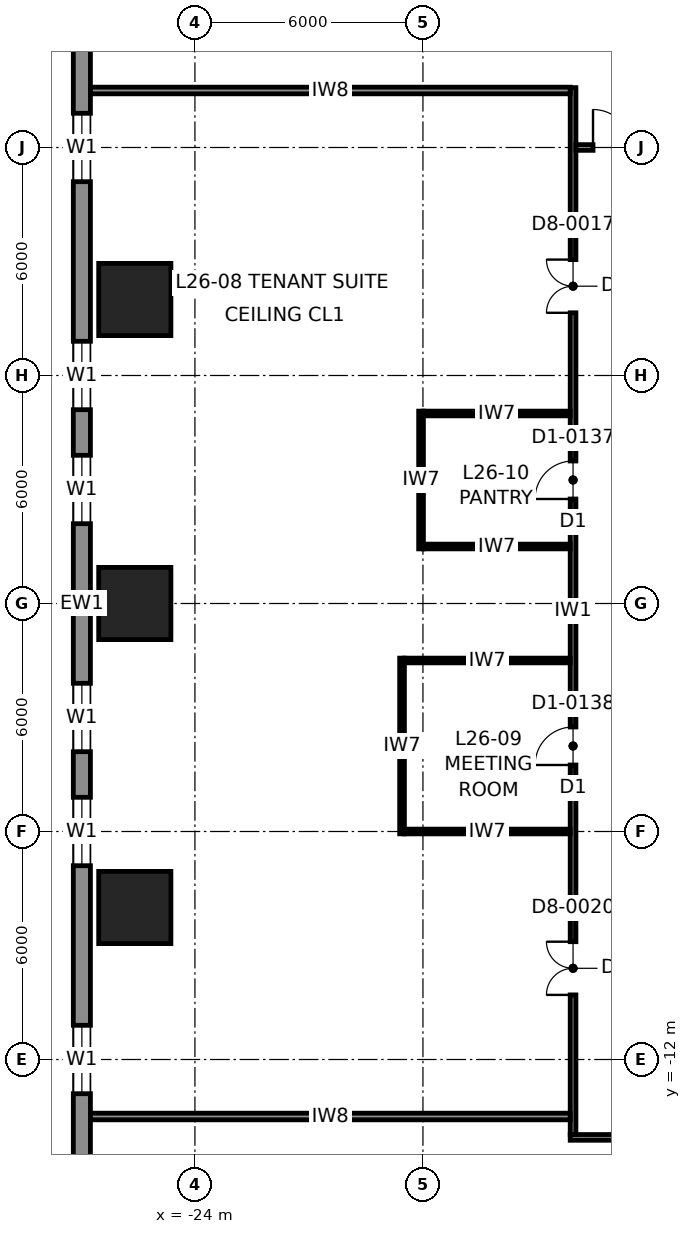
"""IFC4 building model, lengths in metres.
Left out: names, types, materials, properties, quantities, classifications, styles, units other than length and angle.
Written with IfcOpenShell. Run it as: python <this file> out.ifc"""

import sys

from ifc_helpers import new_model, si_unit, direction, frame, frame_2d, origin, origin_2d, place, context, subcontext, project, spatial, rectangle, extrude, element, fill, save


model = new_model("IFC4")
c1 = context("Model", 3, precision=1e-05, world=origin(), true_north=direction((0.0, 1.0)))
c2 = subcontext(c1, "Body", "Model", "MODEL_VIEW")
j1 = project(units=[si_unit("LENGTHUNIT", "METRE"), si_unit("PLANEANGLEUNIT", "RADIAN")], contexts=[c1])
p1 = place(None, origin())
s1 = spatial("IfcSite", under=j1, at=p1, CompositionType="ELEMENT")
p2 = place(p1, origin())
s2 = spatial("IfcBuilding", under=s1, at=p2, CompositionType="ELEMENT")
p3 = place(p2, frame((0.0, 0.0, 131.8)))
s3 = spatial("IfcBuildingStorey", under=s2, at=p3, CompositionType="ELEMENT", Elevation=131.8)
for number, where, z_axis, x_axis in (
    (1, (-25.582, 0.0, 0.0), (0.04, 0.0, 0.999), (0.0, 1.0, 0.0)),
    (2, (-25.582, 8.0, 0.0), (0.04, 0.0, 0.999), (0.0, 1.0, 0.0)),
    (3, (-25.582, -8.0, 0.0), (0.04, 0.0, 0.999), (0.0, 1.0, 0.0)),
):
    element("IfcColumn", number, at=place(p3, frame(where, z_axis=z_axis, x_axis=x_axis)), inside=s3, PredefinedType="COLUMN", context=c2, shape_type="SweptSolid", body=[
        extrude(rectangle(XDim=1.9, YDim=1.9, at=origin_2d()), origin(), (0.0, 0.0, 1.0), 4.003),
    ])
p4 = place(p3, frame((-26.975, 22.7, 0.0), z_axis=(0.0, 0.0, 1.0), x_axis=(0.0, -1.0, 0.0)))
e4 = element("IfcWall", 4, at=p4, inside=s3, PredefinedType="SOLIDWALL", context=c2, shape_type="SweptSolid", body=[
    extrude(rectangle(XDim=45.4, YDim=0.45, at=frame_2d((22.7, 0.0))), origin(), (0.0, 0.0, 1.0), 3.83),
])
p5 = place(p4, frame((3.8, 0.0, 0.7)))
e5 = element("IfcOpeningElement", 5, at=p5, cuts=e4, PredefinedType="OPENING", context=c2, shape_type="SweptSolid", body=[
    extrude(rectangle(XDim=1.8, YDim=2.6, at=frame_2d((0.9, 1.3))), frame((0.0, 0.235, 0.0), z_axis=(0.0, -1.0, 0.0), x_axis=(1.0, 0.0, 0.0)), (0.0, 0.0, 1.0), 0.47),
])
p6 = place(p4, frame((9.8, 0.0, 0.7)))
e6 = element("IfcOpeningElement", 6, at=p6, cuts=e4, PredefinedType="OPENING", context=c2, shape_type="SweptSolid", body=[
    extrude(rectangle(XDim=1.8, YDim=2.6, at=frame_2d((0.9, 1.3))), frame((0.0, 0.235, 0.0), z_axis=(0.0, -1.0, 0.0), x_axis=(1.0, 0.0, 0.0)), (0.0, 0.0, 1.0), 0.47),
])
p7 = place(p4, frame((15.8, 0.0, 0.7)))
e7 = element("IfcOpeningElement", 7, at=p7, cuts=e4, PredefinedType="OPENING", context=c2, shape_type="SweptSolid", body=[
    extrude(rectangle(XDim=1.8, YDim=2.6, at=frame_2d((0.9, 1.3))), frame((0.0, 0.235, 0.0), z_axis=(0.0, -1.0, 0.0), x_axis=(1.0, 0.0, 0.0)), (0.0, 0.0, 1.0), 0.47),
])
p8 = place(p4, frame((18.8, 0.0, 0.7)))
e8 = element("IfcOpeningElement", 8, at=p8, cuts=e4, PredefinedType="OPENING", context=c2, shape_type="SweptSolid", body=[
    extrude(rectangle(XDim=1.8, YDim=2.6, at=frame_2d((0.9, 1.3))), frame((0.0, 0.235, 0.0), z_axis=(0.0, -1.0, 0.0), x_axis=(1.0, 0.0, 0.0)), (0.0, 0.0, 1.0), 0.47),
])
p9 = place(p4, frame((24.8, 0.0, 0.7)))
e9 = element("IfcOpeningElement", 9, at=p9, cuts=e4, PredefinedType="OPENING", context=c2, shape_type="SweptSolid", body=[
    extrude(rectangle(XDim=1.8, YDim=2.6, at=frame_2d((0.9, 1.3))), frame((0.0, 0.235, 0.0), z_axis=(0.0, -1.0, 0.0), x_axis=(1.0, 0.0, 0.0)), (0.0, 0.0, 1.0), 0.47),
])
p10 = place(p4, frame((27.8, 0.0, 0.7)))
e10 = element("IfcOpeningElement", 10, at=p10, cuts=e4, PredefinedType="OPENING", context=c2, shape_type="SweptSolid", body=[
    extrude(rectangle(XDim=1.8, YDim=2.6, at=frame_2d((0.9, 1.3))), frame((0.0, 0.235, 0.0), z_axis=(0.0, -1.0, 0.0), x_axis=(1.0, 0.0, 0.0)), (0.0, 0.0, 1.0), 0.47),
])
p11 = place(p4, frame((33.8, 0.0, 0.7)))
e11 = element("IfcOpeningElement", 11, at=p11, cuts=e4, PredefinedType="OPENING", context=c2, shape_type="SweptSolid", body=[
    extrude(rectangle(XDim=1.8, YDim=2.6, at=frame_2d((0.9, 1.3))), frame((0.0, 0.235, 0.0), z_axis=(0.0, -1.0, 0.0), x_axis=(1.0, 0.0, 0.0)), (0.0, 0.0, 1.0), 0.47),
])
p12 = place(p4, frame((39.8, 0.0, 0.7)))
e12 = element("IfcOpeningElement", 12, at=p12, cuts=e4, PredefinedType="OPENING", context=c2, shape_type="SweptSolid", body=[
    extrude(rectangle(XDim=1.8, YDim=2.6, at=frame_2d((0.9, 1.3))), frame((0.0, 0.235, 0.0), z_axis=(0.0, -1.0, 0.0), x_axis=(1.0, 0.0, 0.0)), (0.0, 0.0, 1.0), 0.47),
])
p13 = place(p3, frame((14.125, -14.05, 0.0), z_axis=(0.0, 0.0, 1.0), x_axis=(-1.0, 0.0, 0.0)))
e13 = element("IfcWall", 13, at=p13, inside=s3, PredefinedType="PARTITIONING", context=c2, shape_type="SweptSolid", body=[
    extrude(rectangle(XDim=28.25, YDim=0.15, at=frame_2d((14.125, 0.0))), origin(), (0.0, 0.0, 1.0), 3.83),
])
p14 = place(p13, frame((24.325, 0.0, 0.0)))
e14 = element("IfcOpeningElement", 14, at=p14, cuts=e13, PredefinedType="OPENING", context=c2, shape_type="SweptSolid", body=[
    extrude(rectangle(XDim=1.4, YDim=2.3, at=frame_2d((0.7, 1.15))), frame((0.0, 0.085, 0.0), z_axis=(0.0, -1.0, 0.0), x_axis=(1.0, 0.0, 0.0)), (0.0, 0.0, 1.0), 0.17),
])
p15 = place(p13, frame((13.425, 0.0, 0.0)))
e15 = element("IfcOpeningElement", 15, at=p15, cuts=e13, PredefinedType="OPENING", context=c2, shape_type="SweptSolid", body=[
    extrude(rectangle(XDim=1.4, YDim=2.3, at=frame_2d((0.7, 1.15))), frame((0.0, 0.085, 0.0), z_axis=(0.0, -1.0, 0.0), x_axis=(1.0, 0.0, 0.0)), (0.0, 0.0, 1.0), 0.17),
])
p16 = place(p13, frame((2.525, 0.0, 0.0)))
e16 = element("IfcOpeningElement", 16, at=p16, cuts=e13, PredefinedType="OPENING", context=c2, shape_type="SweptSolid", body=[
    extrude(rectangle(XDim=1.4, YDim=2.3, at=frame_2d((0.7, 1.15))), frame((0.0, 0.085, 0.0), z_axis=(0.0, -1.0, 0.0), x_axis=(1.0, 0.0, 0.0)), (0.0, 0.0, 1.0), 0.17),
])
p17 = place(p3, frame((-14.05, 13.575, 0.0), z_axis=(0.0, 0.0, 1.0), x_axis=(0.0, -1.0, 0.0)))
e17 = element("IfcWall", 17, at=p17, inside=s3, PredefinedType="PARTITIONING", context=c2, shape_type="SweptSolid", body=[
    extrude(rectangle(XDim=27.55, YDim=0.15, at=frame_2d((13.775, 0.0))), origin(), (0.0, 0.0, 1.0), 3.83),
])
p18 = place(p17, frame((22.475, 0.0, 0.0)))
e18 = element("IfcOpeningElement", 18, at=p18, cuts=e17, PredefinedType="OPENING", context=c2, shape_type="SweptSolid", body=[
    extrude(rectangle(XDim=1.4, YDim=2.3, at=frame_2d((0.7, 1.15))), frame((0.0, 0.085, 0.0), z_axis=(0.0, -1.0, 0.0), x_axis=(1.0, 0.0, 0.0)), (0.0, 0.0, 1.0), 0.17),
])
p19 = place(p17, frame((4.525, 0.0, 0.0)))
e19 = element("IfcOpeningElement", 19, at=p19, cuts=e17, PredefinedType="OPENING", context=c2, shape_type="SweptSolid", body=[
    extrude(rectangle(XDim=1.4, YDim=2.3, at=frame_2d((0.7, 1.15))), frame((0.0, 0.085, 0.0), z_axis=(0.0, -1.0, 0.0), x_axis=(1.0, 0.0, 0.0)), (0.0, 0.0, 1.0), 0.17),
])
p20 = place(p17, frame((16.825, 0.0, 0.0)))
e20 = element("IfcOpeningElement", 20, at=p20, cuts=e17, PredefinedType="OPENING", context=c2, shape_type="SweptSolid", body=[
    extrude(rectangle(XDim=1.0, YDim=2.3, at=frame_2d((0.5, 1.15))), frame((0.0, 0.085, 0.0), z_axis=(0.0, -1.0, 0.0), x_axis=(1.0, 0.0, 0.0)), (0.0, 0.0, 1.0), 0.17),
])
p21 = place(p17, frame((9.825, 0.0, 0.0)))
e21 = element("IfcOpeningElement", 21, at=p21, cuts=e17, PredefinedType="OPENING", context=c2, shape_type="SweptSolid", body=[
    extrude(rectangle(XDim=1.0, YDim=2.3, at=frame_2d((0.5, 1.15))), frame((0.0, 0.085, 0.0), z_axis=(0.0, -1.0, 0.0), x_axis=(1.0, 0.0, 0.0)), (0.0, 0.0, 1.0), 0.17),
])
p22 = place(p3, frame((-13.975, 12.0, 0.0), z_axis=(0.0, 0.0, 1.0), x_axis=(1.0, 0.0, 0.0)))
e22 = element("IfcWall", 22, at=p22, inside=s3, PredefinedType="PARTITIONING", context=c2, shape_type="SweptSolid", body=[
    extrude(rectangle(XDim=1.975, YDim=0.15, at=frame_2d((0.988, 0.0))), origin(), (0.0, 0.0, 1.0), 3.83),
])
p23 = place(p22, frame((0.45, 0.0, 0.0)))
e23 = element("IfcOpeningElement", 23, at=p23, cuts=e22, PredefinedType="OPENING", context=c2, shape_type="SweptSolid", body=[
    extrude(rectangle(XDim=1.0, YDim=2.3, at=frame_2d((0.5, 1.15))), frame((0.0, 0.085, 0.0), z_axis=(0.0, -1.0, 0.0), x_axis=(1.0, 0.0, 0.0)), (0.0, 0.0, 1.0), 0.17),
])
for number, where, z_axis, x_axis in (
    (24, (-26.75, 13.5, 0.0), (0.0, 0.0, 1.0), (1.0, 0.0, 0.0)),
    (25, (-14.125, -13.5, 0.0), (0.0, 0.0, 1.0), (-1.0, 0.0, 0.0)),
):
    element("IfcWall", number, at=place(p3, frame(where, z_axis=z_axis, x_axis=x_axis)), inside=s3, PredefinedType="PARTITIONING", context=c2, shape_type="SweptSolid", body=[
        extrude(rectangle(XDim=12.625, YDim=0.175, at=frame_2d((6.312, 0.0))), origin(), (0.0, 0.0, 1.0), 3.83),
    ])
p24 = place(p3, frame((-18.55, -6.062, 0.0), z_axis=(0.0, 0.0, 1.0), x_axis=(0.0, 1.0, 0.0)))
e26 = element("IfcWall", 26, at=p24, inside=s3, PredefinedType="PARTITIONING", context=c2, shape_type="SweptSolid", body=[
    extrude(rectangle(XDim=4.625, YDim=0.125, at=frame_2d((2.312, 0.0))), origin(), (0.0, 0.0, 1.0), 3.83),
])
for number, where, z_axis, x_axis in (
    (27, (-14.125, -6.0, 0.0), (0.0, 0.0, 1.0), (-1.0, 0.0, 0.0)),
    (28, (-14.125, -1.5, 0.0), (0.0, 0.0, 1.0), (-1.0, 0.0, 0.0)),
):
    element("IfcWall", number, at=place(p3, frame(where, z_axis=z_axis, x_axis=x_axis)), inside=s3, PredefinedType="PARTITIONING", context=c2, shape_type="SweptSolid", body=[
        extrude(rectangle(XDim=4.363, YDim=0.125, at=frame_2d((2.181, 0.0))), origin(), (0.0, 0.0, 1.0), 3.83),
    ])
p25 = place(p3, frame((-18.05, 1.438, 0.0), z_axis=(0.0, 0.0, 1.0), x_axis=(0.0, 1.0, 0.0)))
e29 = element("IfcWall", 29, at=p25, inside=s3, PredefinedType="PARTITIONING", context=c2, shape_type="SweptSolid", body=[
    extrude(rectangle(XDim=3.625, YDim=0.125, at=frame_2d((1.812, 0.0))), origin(), (0.0, 0.0, 1.0), 3.83),
])
for number, where, z_axis, x_axis in (
    (30, (-14.125, 1.5, 0.0), (0.0, 0.0, 1.0), (-1.0, 0.0, 0.0)),
    (31, (-14.125, 5.0, 0.0), (0.0, 0.0, 1.0), (-1.0, 0.0, 0.0)),
):
    element("IfcWall", number, at=place(p3, frame(where, z_axis=z_axis, x_axis=x_axis)), inside=s3, PredefinedType="PARTITIONING", context=c2, shape_type="SweptSolid", body=[
        extrude(rectangle(XDim=3.863, YDim=0.125, at=frame_2d((1.931, 0.0))), origin(), (0.0, 0.0, 1.0), 3.83),
    ])
p26 = place(p6, origin())
e32 = element("IfcWindow", 32, at=p26, inside=s3, PartitioningType="SINGLE_PANEL", PredefinedType="WINDOW", context=c2, shape_type="SweptSolid", body=[
    extrude(rectangle(XDim=1.8, YDim=2.6, at=frame_2d((0.9, 1.3))), frame((0.0, 0.03, 0.0), z_axis=(0.0, -1.0, 0.0), x_axis=(1.0, 0.0, 0.0)), (0.0, 0.0, 1.0), 0.06),
])
fill(e6, e32)
p27 = place(p7, origin())
e33 = element("IfcWindow", 33, at=p27, inside=s3, PartitioningType="SINGLE_PANEL", PredefinedType="WINDOW", context=c2, shape_type="SweptSolid", body=[
    extrude(rectangle(XDim=1.8, YDim=2.6, at=frame_2d((0.9, 1.3))), frame((0.0, 0.03, 0.0), z_axis=(0.0, -1.0, 0.0), x_axis=(1.0, 0.0, 0.0)), (0.0, 0.0, 1.0), 0.06),
])
fill(e7, e33)
p28 = place(p8, origin())
e34 = element("IfcWindow", 34, at=p28, inside=s3, PartitioningType="SINGLE_PANEL", PredefinedType="WINDOW", context=c2, shape_type="SweptSolid", body=[
    extrude(rectangle(XDim=1.8, YDim=2.6, at=frame_2d((0.9, 1.3))), frame((0.0, 0.03, 0.0), z_axis=(0.0, -1.0, 0.0), x_axis=(1.0, 0.0, 0.0)), (0.0, 0.0, 1.0), 0.06),
])
fill(e8, e34)
p29 = place(p9, origin())
e35 = element("IfcWindow", 35, at=p29, inside=s3, PartitioningType="SINGLE_PANEL", PredefinedType="WINDOW", context=c2, shape_type="SweptSolid", body=[
    extrude(rectangle(XDim=1.8, YDim=2.6, at=frame_2d((0.9, 1.3))), frame((0.0, 0.03, 0.0), z_axis=(0.0, -1.0, 0.0), x_axis=(1.0, 0.0, 0.0)), (0.0, 0.0, 1.0), 0.06),
])
fill(e9, e35)
p30 = place(p10, origin())
e36 = element("IfcWindow", 36, at=p30, inside=s3, PartitioningType="SINGLE_PANEL", PredefinedType="WINDOW", context=c2, shape_type="SweptSolid", body=[
    extrude(rectangle(XDim=1.8, YDim=2.6, at=frame_2d((0.9, 1.3))), frame((0.0, 0.03, 0.0), z_axis=(0.0, -1.0, 0.0), x_axis=(1.0, 0.0, 0.0)), (0.0, 0.0, 1.0), 0.06),
])
fill(e10, e36)
p31 = place(p11, origin())
e37 = element("IfcWindow", 37, at=p31, inside=s3, PartitioningType="SINGLE_PANEL", PredefinedType="WINDOW", context=c2, shape_type="SweptSolid", body=[
    extrude(rectangle(XDim=1.8, YDim=2.6, at=frame_2d((0.9, 1.3))), frame((0.0, 0.03, 0.0), z_axis=(0.0, -1.0, 0.0), x_axis=(1.0, 0.0, 0.0)), (0.0, 0.0, 1.0), 0.06),
])
fill(e11, e37)
p32 = place(p23, origin())
e38 = element("IfcDoor", 38, at=p32, inside=s3, OperationType="SINGLE_SWING_LEFT", PredefinedType="DOOR", context=c2, shape_type="SweptSolid", body=[
    extrude(rectangle(XDim=1.0, YDim=2.3, at=frame_2d((0.5, 1.15))), frame((0.0, 0.025, 0.0), z_axis=(0.0, -1.0, 0.0), x_axis=(1.0, 0.0, 0.0)), (0.0, 0.0, 1.0), 0.05),
])
fill(e23, e38)
p33 = place(p18, frame((1.4, 0.0, 0.0), z_axis=(0.0, 0.0, 1.0), x_axis=(-1.0, 0.0, 0.0)))
e39 = element("IfcDoor", 39, at=p33, inside=s3, OperationType="DOUBLE_DOOR_SINGLE_SWING", PredefinedType="DOOR", context=c2, shape_type="SweptSolid", body=[
    extrude(rectangle(XDim=1.4, YDim=2.3, at=frame_2d((0.7, 1.15))), frame((0.0, 0.025, 0.0), z_axis=(0.0, -1.0, 0.0), x_axis=(1.0, 0.0, 0.0)), (0.0, 0.0, 1.0), 0.05),
])
fill(e18, e39)
p34 = place(p19, frame((1.4, 0.0, 0.0), z_axis=(0.0, 0.0, 1.0), x_axis=(-1.0, 0.0, 0.0)))
e40 = element("IfcDoor", 40, at=p34, inside=s3, OperationType="DOUBLE_DOOR_SINGLE_SWING", PredefinedType="DOOR", context=c2, shape_type="SweptSolid", body=[
    extrude(rectangle(XDim=1.4, YDim=2.3, at=frame_2d((0.7, 1.15))), frame((0.0, 0.025, 0.0), z_axis=(0.0, -1.0, 0.0), x_axis=(1.0, 0.0, 0.0)), (0.0, 0.0, 1.0), 0.05),
])
fill(e19, e40)
p35 = place(p20, frame((1.0, 0.0, 0.0), z_axis=(0.0, 0.0, 1.0), x_axis=(-1.0, 0.0, 0.0)))
e41 = element("IfcDoor", 41, at=p35, inside=s3, OperationType="SINGLE_SWING_LEFT", PredefinedType="DOOR", context=c2, shape_type="SweptSolid", body=[
    extrude(rectangle(XDim=1.0, YDim=2.3, at=frame_2d((0.5, 1.15))), frame((0.0, 0.025, 0.0), z_axis=(0.0, -1.0, 0.0), x_axis=(1.0, 0.0, 0.0)), (0.0, 0.0, 1.0), 0.05),
])
fill(e20, e41)
p36 = place(p21, frame((1.0, 0.0, 0.0), z_axis=(0.0, 0.0, 1.0), x_axis=(-1.0, 0.0, 0.0)))
e42 = element("IfcDoor", 42, at=p36, inside=s3, OperationType="SINGLE_SWING_LEFT", PredefinedType="DOOR", context=c2, shape_type="SweptSolid", body=[
    extrude(rectangle(XDim=1.0, YDim=2.3, at=frame_2d((0.5, 1.15))), frame((0.0, 0.025, 0.0), z_axis=(0.0, -1.0, 0.0), x_axis=(1.0, 0.0, 0.0)), (0.0, 0.0, 1.0), 0.05),
])
fill(e21, e42)
save(model, sys.argv[1])
